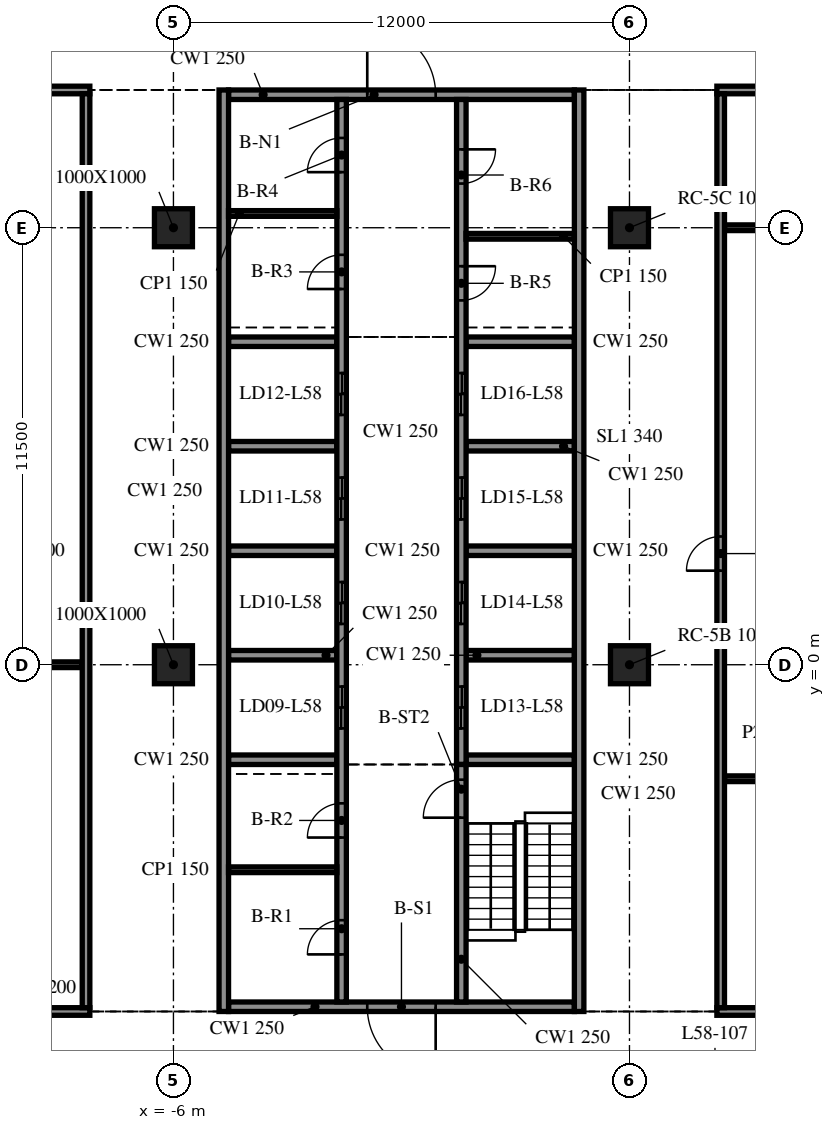
"""IFC4 building model, lengths in metres.
Left out: names, types, materials, properties, quantities, classifications, styles, units other than length and angle.
Written with IfcOpenShell. Run it as: python <this file> out.ifc"""

import sys

from ifc_helpers import new_model, si_unit, direction, frame, frame_2d, origin, origin_2d, place, context, subcontext, project, spatial, rectangle, extrude, element, fill, save


model = new_model("IFC4")
c1 = context("Model", 3, precision=1e-05, world=origin(), true_north=direction((0.0, 1.0)))
c2 = subcontext(c1, "Body", "Model", "MODEL_VIEW")
j1 = project(units=[si_unit("LENGTHUNIT", "METRE"), si_unit("PLANEANGLEUNIT", "RADIAN")], contexts=[c1])
p1 = place(None, origin())
s1 = spatial("IfcSite", under=j1, at=p1, CompositionType="ELEMENT")
p2 = place(p1, origin())
s2 = spatial("IfcBuilding", under=s1, at=p2, CompositionType="ELEMENT")
p3 = place(p2, frame((0.0, 0.0, 240.0)))
s3 = spatial("IfcBuildingStorey", under=s2, at=p3, CompositionType="ELEMENT", Elevation=240.0)
for number, where, z_axis, x_axis in (
    (1, (-6.0, 0.0, -0.34), (0.0, 0.0, 1.0), (1.0, 0.0, 0.0)),
    (2, (-6.0, 11.5, -0.34), (0.0, 0.0, 1.0), (1.0, 0.0, 0.0)),
    (3, (6.0, 0.0, -0.34), (0.0, 0.0, 1.0), (1.0, 0.0, 0.0)),
    (4, (6.0, 11.5, -0.34), (0.0, 0.0, 1.0), (1.0, 0.0, 0.0)),
):
    element("IfcColumn", number, at=place(p3, frame(where, z_axis=z_axis, x_axis=x_axis)), inside=s3, PredefinedType="COLUMN", context=c2, shape_type="SweptSolid", body=[
        extrude(rectangle(XDim=1.0, YDim=1.0, at=origin_2d()), origin(), (0.0, 0.0, 1.0), 3.8),
    ])
for number, where, z_axis, x_axis in (
    (5, (-4.675, 15.125, 0.0), (0.0, 0.0, 1.0), (0.0, -1.0, 0.0)),
    (6, (4.675, -9.125, 0.0), (0.0, 0.0, 1.0), (0.0, 1.0, 0.0)),
):
    element("IfcWall", number, at=place(p3, frame(where, z_axis=z_axis, x_axis=x_axis)), inside=s3, PredefinedType="SOLIDWALL", context=c2, shape_type="SweptSolid", body=[
        extrude(rectangle(XDim=24.25, YDim=0.25, at=frame_2d((12.125, 0.0))), origin(), (0.0, 0.0, 1.0), 3.46),
    ])
p4 = place(p3, frame((4.55, -9.0, 0.0), z_axis=(0.0, 0.0, 1.0), x_axis=(-1.0, 0.0, 0.0)))
e7 = element("IfcWall", 7, at=p4, inside=s3, PredefinedType="SOLIDWALL", context=c2, shape_type="SweptSolid", body=[
    extrude(rectangle(XDim=9.1, YDim=0.25, at=frame_2d((4.55, 0.0))), origin(), (0.0, 0.0, 1.0), 3.46),
])
p5 = place(p4, frame((3.65, 0.0, 0.0)))
e8 = element("IfcOpeningElement", 8, at=p5, cuts=e7, PredefinedType="OPENING", context=c2, shape_type="SweptSolid", body=[
    extrude(rectangle(XDim=1.8, YDim=2.1, at=frame_2d((0.9, 1.05))), frame((0.0, 0.135, 0.0), z_axis=(0.0, -1.0, 0.0), x_axis=(1.0, 0.0, 0.0)), (0.0, 0.0, 1.0), 0.27),
])
p6 = place(p3, frame((-4.55, 15.0, 0.0), z_axis=(0.0, 0.0, 1.0), x_axis=(1.0, 0.0, 0.0)))
e9 = element("IfcWall", 9, at=p6, inside=s3, PredefinedType="SOLIDWALL", context=c2, shape_type="SweptSolid", body=[
    extrude(rectangle(XDim=9.1, YDim=0.25, at=frame_2d((4.55, 0.0))), origin(), (0.0, 0.0, 1.0), 3.46),
])
p7 = place(p6, frame((3.65, 0.0, 0.0)))
e10 = element("IfcOpeningElement", 10, at=p7, cuts=e9, PredefinedType="OPENING", context=c2, shape_type="SweptSolid", body=[
    extrude(rectangle(XDim=1.8, YDim=2.1, at=frame_2d((0.9, 1.05))), frame((0.0, 0.135, 0.0), z_axis=(0.0, -1.0, 0.0), x_axis=(1.0, 0.0, 0.0)), (0.0, 0.0, 1.0), 0.27),
])
p8 = place(p3, frame((-1.575, -8.875, 0.0), z_axis=(0.0, 0.0, 1.0), x_axis=(0.0, 1.0, 0.0)))
e11 = element("IfcWall", 11, at=p8, inside=s3, PredefinedType="SOLIDWALL", context=c2, shape_type="SweptSolid", body=[
    extrude(rectangle(XDim=23.75, YDim=0.25, at=frame_2d((11.875, 0.0))), origin(), (0.0, 0.0, 1.0), 3.46),
])
p9 = place(p8, frame((7.2, 0.0, 0.0)))
e12 = element("IfcOpeningElement", 12, at=p9, cuts=e11, PredefinedType="OPENING", context=c2, shape_type="SweptSolid", body=[
    extrude(rectangle(XDim=1.1, YDim=2.1, at=frame_2d((0.55, 1.05))), frame((0.0, 0.135, 0.0), z_axis=(0.0, -1.0, 0.0), x_axis=(1.0, 0.0, 0.0)), (0.0, 0.0, 1.0), 0.27),
])
p10 = place(p8, frame((9.95, 0.0, 0.0)))
e13 = element("IfcOpeningElement", 13, at=p10, cuts=e11, PredefinedType="OPENING", context=c2, shape_type="SweptSolid", body=[
    extrude(rectangle(XDim=1.1, YDim=2.1, at=frame_2d((0.55, 1.05))), frame((0.0, 0.135, 0.0), z_axis=(0.0, -1.0, 0.0), x_axis=(1.0, 0.0, 0.0)), (0.0, 0.0, 1.0), 0.27),
])
p11 = place(p8, frame((12.7, 0.0, 0.0)))
e14 = element("IfcOpeningElement", 14, at=p11, cuts=e11, PredefinedType="OPENING", context=c2, shape_type="SweptSolid", body=[
    extrude(rectangle(XDim=1.1, YDim=2.1, at=frame_2d((0.55, 1.05))), frame((0.0, 0.135, 0.0), z_axis=(0.0, -1.0, 0.0), x_axis=(1.0, 0.0, 0.0)), (0.0, 0.0, 1.0), 0.27),
])
p12 = place(p8, frame((15.45, 0.0, 0.0)))
e15 = element("IfcOpeningElement", 15, at=p12, cuts=e11, PredefinedType="OPENING", context=c2, shape_type="SweptSolid", body=[
    extrude(rectangle(XDim=1.1, YDim=2.1, at=frame_2d((0.55, 1.05))), frame((0.0, 0.135, 0.0), z_axis=(0.0, -1.0, 0.0), x_axis=(1.0, 0.0, 0.0)), (0.0, 0.0, 1.0), 0.27),
])
p13 = place(p8, frame((1.252, 0.0, 0.0)))
e16 = element("IfcOpeningElement", 16, at=p13, cuts=e11, PredefinedType="OPENING", context=c2, shape_type="SweptSolid", body=[
    extrude(rectangle(XDim=0.9, YDim=2.1, at=frame_2d((0.45, 1.05))), frame((0.0, 0.135, 0.0), z_axis=(0.0, -1.0, 0.0), x_axis=(1.0, 0.0, 0.0)), (0.0, 0.0, 1.0), 0.27),
])
p14 = place(p8, frame((4.327, 0.0, 0.0)))
e17 = element("IfcOpeningElement", 17, at=p14, cuts=e11, PredefinedType="OPENING", context=c2, shape_type="SweptSolid", body=[
    extrude(rectangle(XDim=0.9, YDim=2.1, at=frame_2d((0.45, 1.05))), frame((0.0, 0.135, 0.0), z_axis=(0.0, -1.0, 0.0), x_axis=(1.0, 0.0, 0.0)), (0.0, 0.0, 1.0), 0.27),
])
p15 = place(p8, frame((18.762, 0.0, 0.0)))
e18 = element("IfcOpeningElement", 18, at=p15, cuts=e11, PredefinedType="OPENING", context=c2, shape_type="SweptSolid", body=[
    extrude(rectangle(XDim=0.9, YDim=2.1, at=frame_2d((0.45, 1.05))), frame((0.0, 0.135, 0.0), z_axis=(0.0, -1.0, 0.0), x_axis=(1.0, 0.0, 0.0)), (0.0, 0.0, 1.0), 0.27),
])
p16 = place(p8, frame((21.837, 0.0, 0.0)))
e19 = element("IfcOpeningElement", 19, at=p16, cuts=e11, PredefinedType="OPENING", context=c2, shape_type="SweptSolid", body=[
    extrude(rectangle(XDim=0.9, YDim=2.1, at=frame_2d((0.45, 1.05))), frame((0.0, 0.135, 0.0), z_axis=(0.0, -1.0, 0.0), x_axis=(1.0, 0.0, 0.0)), (0.0, 0.0, 1.0), 0.27),
])
p17 = place(p3, frame((1.575, -8.875, 0.0), z_axis=(0.0, 0.0, 1.0), x_axis=(0.0, 1.0, 0.0)))
e20 = element("IfcWall", 20, at=p17, inside=s3, PredefinedType="SOLIDWALL", context=c2, shape_type="SweptSolid", body=[
    extrude(rectangle(XDim=6.25, YDim=0.25, at=frame_2d((3.125, 0.0))), origin(), (0.0, 0.0, 1.0), 3.46),
])
p18 = place(p17, frame((4.85, 0.0, 0.0)))
e21 = element("IfcOpeningElement", 21, at=p18, cuts=e20, PredefinedType="OPENING", context=c2, shape_type="SweptSolid", body=[
    extrude(rectangle(XDim=1.0, YDim=2.1, at=frame_2d((0.5, 1.05))), frame((0.0, 0.135, 0.0), z_axis=(0.0, -1.0, 0.0), x_axis=(1.0, 0.0, 0.0)), (0.0, 0.0, 1.0), 0.27),
])
p19 = place(p3, frame((1.575, 14.875, 0.0), z_axis=(0.0, 0.0, 1.0), x_axis=(0.0, -1.0, 0.0)))
e22 = element("IfcWall", 22, at=p19, inside=s3, PredefinedType="SOLIDWALL", context=c2, shape_type="SweptSolid", body=[
    extrude(rectangle(XDim=17.5, YDim=0.25, at=frame_2d((8.75, 0.0))), origin(), (0.0, 0.0, 1.0), 3.46),
])
p20 = place(p19, frame((15.45, 0.0, 0.0)))
e23 = element("IfcOpeningElement", 23, at=p20, cuts=e22, PredefinedType="OPENING", context=c2, shape_type="SweptSolid", body=[
    extrude(rectangle(XDim=1.1, YDim=2.1, at=frame_2d((0.55, 1.05))), frame((0.0, 0.135, 0.0), z_axis=(0.0, -1.0, 0.0), x_axis=(1.0, 0.0, 0.0)), (0.0, 0.0, 1.0), 0.27),
])
p21 = place(p19, frame((12.7, 0.0, 0.0)))
e24 = element("IfcOpeningElement", 24, at=p21, cuts=e22, PredefinedType="OPENING", context=c2, shape_type="SweptSolid", body=[
    extrude(rectangle(XDim=1.1, YDim=2.1, at=frame_2d((0.55, 1.05))), frame((0.0, 0.135, 0.0), z_axis=(0.0, -1.0, 0.0), x_axis=(1.0, 0.0, 0.0)), (0.0, 0.0, 1.0), 0.27),
])
p22 = place(p19, frame((9.95, 0.0, 0.0)))
e25 = element("IfcOpeningElement", 25, at=p22, cuts=e22, PredefinedType="OPENING", context=c2, shape_type="SweptSolid", body=[
    extrude(rectangle(XDim=1.1, YDim=2.1, at=frame_2d((0.55, 1.05))), frame((0.0, 0.135, 0.0), z_axis=(0.0, -1.0, 0.0), x_axis=(1.0, 0.0, 0.0)), (0.0, 0.0, 1.0), 0.27),
])
p23 = place(p19, frame((7.2, 0.0, 0.0)))
e26 = element("IfcOpeningElement", 26, at=p23, cuts=e22, PredefinedType="OPENING", context=c2, shape_type="SweptSolid", body=[
    extrude(rectangle(XDim=1.1, YDim=2.1, at=frame_2d((0.55, 1.05))), frame((0.0, 0.135, 0.0), z_axis=(0.0, -1.0, 0.0), x_axis=(1.0, 0.0, 0.0)), (0.0, 0.0, 1.0), 0.27),
])
p24 = place(p19, frame((4.387, 0.0, 0.0)))
e27 = element("IfcOpeningElement", 27, at=p24, cuts=e22, PredefinedType="OPENING", context=c2, shape_type="SweptSolid", body=[
    extrude(rectangle(XDim=0.9, YDim=2.1, at=frame_2d((0.45, 1.05))), frame((0.0, 0.135, 0.0), z_axis=(0.0, -1.0, 0.0), x_axis=(1.0, 0.0, 0.0)), (0.0, 0.0, 1.0), 0.27),
])
p25 = place(p19, frame((1.312, 0.0, 0.0)))
e28 = element("IfcOpeningElement", 28, at=p25, cuts=e22, PredefinedType="OPENING", context=c2, shape_type="SweptSolid", body=[
    extrude(rectangle(XDim=0.9, YDim=2.1, at=frame_2d((0.45, 1.05))), frame((0.0, 0.135, 0.0), z_axis=(0.0, -1.0, 0.0), x_axis=(1.0, 0.0, 0.0)), (0.0, 0.0, 1.0), 0.27),
])
for number, where, z_axis, x_axis in (
    (29, (-4.55, -2.5, 0.0), (0.0, 0.0, 1.0), (1.0, 0.0, 0.0)),
    (30, (-4.55, 0.25, 0.0), (0.0, 0.0, 1.0), (1.0, 0.0, 0.0)),
    (31, (-4.55, 3.0, 0.0), (0.0, 0.0, 1.0), (1.0, 0.0, 0.0)),
    (32, (-4.55, 5.75, 0.0), (0.0, 0.0, 1.0), (1.0, 0.0, 0.0)),
    (33, (-4.55, 8.5, 0.0), (0.0, 0.0, 1.0), (1.0, 0.0, 0.0)),
    (34, (1.7, -2.5, 0.0), (0.0, 0.0, 1.0), (1.0, 0.0, 0.0)),
    (35, (1.7, 0.25, 0.0), (0.0, 0.0, 1.0), (1.0, 0.0, 0.0)),
    (36, (1.7, 3.0, 0.0), (0.0, 0.0, 1.0), (1.0, 0.0, 0.0)),
    (37, (1.7, 5.75, 0.0), (0.0, 0.0, 1.0), (1.0, 0.0, 0.0)),
    (38, (1.7, 8.5, 0.0), (0.0, 0.0, 1.0), (1.0, 0.0, 0.0)),
):
    element("IfcWall", number, at=place(p3, frame(where, z_axis=z_axis, x_axis=x_axis)), inside=s3, PredefinedType="SOLIDWALL", context=c2, shape_type="SweptSolid", body=[
        extrude(rectangle(XDim=2.85, YDim=0.25, at=frame_2d((1.425, 0.0))), origin(), (0.0, 0.0, 1.0), 3.46),
    ])
for number, where, z_axis, x_axis in (
    (39, (-4.55, -5.395, 0.0), (0.0, 0.0, 1.0), (1.0, 0.0, 0.0)),
    (40, (-4.55, 11.875, 0.0), (0.0, 0.0, 1.0), (1.0, 0.0, 0.0)),
    (41, (1.7, 11.275, 0.0), (0.0, 0.0, 1.0), (1.0, 0.0, 0.0)),
):
    element("IfcWall", number, at=place(p3, frame(where, z_axis=z_axis, x_axis=x_axis)), inside=s3, PredefinedType="PARTITIONING", context=c2, shape_type="SweptSolid", body=[
        extrude(rectangle(XDim=2.85, YDim=0.15, at=frame_2d((1.425, 0.0))), origin(), (0.0, 0.0, 1.0), 3.46),
    ])
p26 = place(p3, frame((-15.9, -9.125, 0.0), z_axis=(0.0, 0.0, 1.0), x_axis=(1.0, 0.0, 0.0)))
e42 = element("IfcWall", 42, at=p26, inside=s3, PredefinedType="PARTITIONING", context=c2, shape_type="SweptSolid", body=[
    extrude(rectangle(XDim=7.7, YDim=0.2, at=frame_2d((3.85, 0.0))), origin(), (0.0, 0.0, 1.0), 3.46),
])
p27 = place(p26, frame((3.3, 0.0, 0.0)))
e43 = element("IfcOpeningElement", 43, at=p27, cuts=e42, PredefinedType="OPENING", context=c2, shape_type="SweptSolid", body=[
    extrude(rectangle(XDim=0.9, YDim=2.1, at=frame_2d((0.45, 1.05))), frame((0.0, 0.11, 0.0), z_axis=(0.0, -1.0, 0.0), x_axis=(1.0, 0.0, 0.0)), (0.0, 0.0, 1.0), 0.22),
])
p28 = place(p3, frame((8.3, -9.125, 0.0), z_axis=(0.0, 0.0, 1.0), x_axis=(1.0, 0.0, 0.0)))
e44 = element("IfcWall", 44, at=p28, inside=s3, PredefinedType="PARTITIONING", context=c2, shape_type="SweptSolid", body=[
    extrude(rectangle(XDim=7.3, YDim=0.2, at=frame_2d((3.65, 0.0))), origin(), (0.0, 0.0, 1.0), 3.46),
])
p29 = place(p28, frame((3.1, 0.0, 0.0)))
e45 = element("IfcOpeningElement", 45, at=p29, cuts=e44, PredefinedType="OPENING", context=c2, shape_type="SweptSolid", body=[
    extrude(rectangle(XDim=0.9, YDim=2.1, at=frame_2d((0.45, 1.05))), frame((0.0, 0.11, 0.0), z_axis=(0.0, -1.0, 0.0), x_axis=(1.0, 0.0, 0.0)), (0.0, 0.0, 1.0), 0.22),
])
p30 = place(p3, frame((8.5, -3.0, 0.0), z_axis=(0.0, 0.0, 1.0), x_axis=(1.0, 0.0, 0.0)))
e46 = element("IfcWall", 46, at=p30, inside=s3, PredefinedType="PARTITIONING", context=c2, shape_type="SweptSolid", body=[
    extrude(rectangle(XDim=6.9, YDim=0.15, at=frame_2d((3.45, 0.0))), origin(), (0.0, 0.0, 1.0), 3.46),
])
p31 = place(p3, frame((-15.7, 0.0, 0.0), z_axis=(0.0, 0.0, 1.0), x_axis=(1.0, 0.0, 0.0)))
e47 = element("IfcWall", 47, at=p31, inside=s3, PredefinedType="PARTITIONING", context=c2, shape_type="SweptSolid", body=[
    extrude(rectangle(XDim=7.3, YDim=0.15, at=frame_2d((3.65, 0.0))), origin(), (0.0, 0.0, 1.0), 3.46),
])
p32 = place(p3, frame((8.5, 11.5, 0.0), z_axis=(0.0, 0.0, 1.0), x_axis=(1.0, 0.0, 0.0)))
e48 = element("IfcWall", 48, at=p32, inside=s3, PredefinedType="PARTITIONING", context=c2, shape_type="SweptSolid", body=[
    extrude(rectangle(XDim=6.9, YDim=0.15, at=frame_2d((3.45, 0.0))), origin(), (0.0, 0.0, 1.0), 3.46),
])
p33 = place(p3, frame((-15.9, 15.125, 0.0), z_axis=(0.0, 0.0, 1.0), x_axis=(1.0, 0.0, 0.0)))
e49 = element("IfcWall", 49, at=p33, inside=s3, PredefinedType="PARTITIONING", context=c2, shape_type="SweptSolid", body=[
    extrude(rectangle(XDim=7.7, YDim=0.2, at=frame_2d((3.85, 0.0))), origin(), (0.0, 0.0, 1.0), 3.46),
])
p34 = place(p3, frame((8.3, 15.125, 0.0), z_axis=(0.0, 0.0, 1.0), x_axis=(1.0, 0.0, 0.0)))
e50 = element("IfcWall", 50, at=p34, inside=s3, PredefinedType="PARTITIONING", context=c2, shape_type="SweptSolid", body=[
    extrude(rectangle(XDim=7.3, YDim=0.2, at=frame_2d((3.65, 0.0))), origin(), (0.0, 0.0, 1.0), 3.46),
])
p35 = place(p34, frame((3.1, 0.0, 0.0)))
e51 = element("IfcOpeningElement", 51, at=p35, cuts=e50, PredefinedType="OPENING", context=c2, shape_type="SweptSolid", body=[
    extrude(rectangle(XDim=0.9, YDim=2.1, at=frame_2d((0.45, 1.05))), frame((0.0, 0.11, 0.0), z_axis=(0.0, -1.0, 0.0), x_axis=(1.0, 0.0, 0.0)), (0.0, 0.0, 1.0), 0.22),
])
p36 = place(p3, frame((-8.3, -9.025, 0.0), z_axis=(0.0, 0.0, 1.0), x_axis=(0.0, 1.0, 0.0)))
e52 = element("IfcWall", 52, at=p36, inside=s3, PredefinedType="PARTITIONING", context=c2, shape_type="SweptSolid", body=[
    extrude(rectangle(XDim=24.05, YDim=0.2, at=frame_2d((12.025, 0.0))), origin(), (0.0, 0.0, 1.0), 3.46),
])
p37 = place(p3, frame((8.4, -9.025, 0.0), z_axis=(0.0, 0.0, 1.0), x_axis=(0.0, 1.0, 0.0)))
e53 = element("IfcWall", 53, at=p37, inside=s3, PredefinedType="PARTITIONING", context=c2, shape_type="SweptSolid", body=[
    extrude(rectangle(XDim=24.05, YDim=0.2, at=frame_2d((12.025, 0.0))), origin(), (0.0, 0.0, 1.0), 3.46),
])
p38 = place(p37, frame((11.5, 0.0, 0.0)))
e54 = element("IfcOpeningElement", 54, at=p38, cuts=e53, PredefinedType="OPENING", context=c2, shape_type="SweptSolid", body=[
    extrude(rectangle(XDim=0.9, YDim=2.1, at=frame_2d((0.45, 1.05))), frame((0.0, 0.11, 0.0), z_axis=(0.0, -1.0, 0.0), x_axis=(1.0, 0.0, 0.0)), (0.0, 0.0, 1.0), 0.22),
])
p39 = place(p5, origin())
e55 = element("IfcDoor", 55, at=p39, inside=s3, OperationType="DOUBLE_DOOR_SINGLE_SWING", PredefinedType="DOOR", context=c2, shape_type="SweptSolid", body=[
    extrude(rectangle(XDim=1.8, YDim=2.1, at=frame_2d((0.9, 1.05))), frame((0.0, 0.025, 0.0), z_axis=(0.0, -1.0, 0.0), x_axis=(1.0, 0.0, 0.0)), (0.0, 0.0, 1.0), 0.05),
])
fill(e8, e55)
p40 = place(p7, origin())
e56 = element("IfcDoor", 56, at=p40, inside=s3, OperationType="DOUBLE_DOOR_SINGLE_SWING", PredefinedType="DOOR", context=c2, shape_type="SweptSolid", body=[
    extrude(rectangle(XDim=1.8, YDim=2.1, at=frame_2d((0.9, 1.05))), frame((0.0, 0.025, 0.0), z_axis=(0.0, -1.0, 0.0), x_axis=(1.0, 0.0, 0.0)), (0.0, 0.0, 1.0), 0.05),
])
fill(e10, e56)
p41 = place(p20, origin())
e57 = element("IfcDoor", 57, at=p41, inside=s3, OperationType="DOUBLE_DOOR_SLIDING", PredefinedType="DOOR", context=c2, shape_type="SweptSolid", body=[
    extrude(rectangle(XDim=1.1, YDim=2.1, at=frame_2d((0.55, 1.05))), frame((0.0, 0.025, 0.0), z_axis=(0.0, -1.0, 0.0), x_axis=(1.0, 0.0, 0.0)), (0.0, 0.0, 1.0), 0.05),
])
fill(e23, e57)
p42 = place(p21, origin())
e58 = element("IfcDoor", 58, at=p42, inside=s3, OperationType="DOUBLE_DOOR_SLIDING", PredefinedType="DOOR", context=c2, shape_type="SweptSolid", body=[
    extrude(rectangle(XDim=1.1, YDim=2.1, at=frame_2d((0.55, 1.05))), frame((0.0, 0.025, 0.0), z_axis=(0.0, -1.0, 0.0), x_axis=(1.0, 0.0, 0.0)), (0.0, 0.0, 1.0), 0.05),
])
fill(e24, e58)
p43 = place(p22, origin())
e59 = element("IfcDoor", 59, at=p43, inside=s3, OperationType="DOUBLE_DOOR_SLIDING", PredefinedType="DOOR", context=c2, shape_type="SweptSolid", body=[
    extrude(rectangle(XDim=1.1, YDim=2.1, at=frame_2d((0.55, 1.05))), frame((0.0, 0.025, 0.0), z_axis=(0.0, -1.0, 0.0), x_axis=(1.0, 0.0, 0.0)), (0.0, 0.0, 1.0), 0.05),
])
fill(e25, e59)
p44 = place(p23, origin())
e60 = element("IfcDoor", 60, at=p44, inside=s3, OperationType="DOUBLE_DOOR_SLIDING", PredefinedType="DOOR", context=c2, shape_type="SweptSolid", body=[
    extrude(rectangle(XDim=1.1, YDim=2.1, at=frame_2d((0.55, 1.05))), frame((0.0, 0.025, 0.0), z_axis=(0.0, -1.0, 0.0), x_axis=(1.0, 0.0, 0.0)), (0.0, 0.0, 1.0), 0.05),
])
fill(e26, e60)
p45 = place(p9, origin())
e61 = element("IfcDoor", 61, at=p45, inside=s3, OperationType="DOUBLE_DOOR_SLIDING", PredefinedType="DOOR", context=c2, shape_type="SweptSolid", body=[
    extrude(rectangle(XDim=1.1, YDim=2.1, at=frame_2d((0.55, 1.05))), frame((0.0, 0.025, 0.0), z_axis=(0.0, -1.0, 0.0), x_axis=(1.0, 0.0, 0.0)), (0.0, 0.0, 1.0), 0.05),
])
fill(e12, e61)
p46 = place(p10, origin())
e62 = element("IfcDoor", 62, at=p46, inside=s3, OperationType="DOUBLE_DOOR_SLIDING", PredefinedType="DOOR", context=c2, shape_type="SweptSolid", body=[
    extrude(rectangle(XDim=1.1, YDim=2.1, at=frame_2d((0.55, 1.05))), frame((0.0, 0.025, 0.0), z_axis=(0.0, -1.0, 0.0), x_axis=(1.0, 0.0, 0.0)), (0.0, 0.0, 1.0), 0.05),
])
fill(e13, e62)
p47 = place(p11, origin())
e63 = element("IfcDoor", 63, at=p47, inside=s3, OperationType="DOUBLE_DOOR_SLIDING", PredefinedType="DOOR", context=c2, shape_type="SweptSolid", body=[
    extrude(rectangle(XDim=1.1, YDim=2.1, at=frame_2d((0.55, 1.05))), frame((0.0, 0.025, 0.0), z_axis=(0.0, -1.0, 0.0), x_axis=(1.0, 0.0, 0.0)), (0.0, 0.0, 1.0), 0.05),
])
fill(e14, e63)
p48 = place(p12, origin())
e64 = element("IfcDoor", 64, at=p48, inside=s3, OperationType="DOUBLE_DOOR_SLIDING", PredefinedType="DOOR", context=c2, shape_type="SweptSolid", body=[
    extrude(rectangle(XDim=1.1, YDim=2.1, at=frame_2d((0.55, 1.05))), frame((0.0, 0.025, 0.0), z_axis=(0.0, -1.0, 0.0), x_axis=(1.0, 0.0, 0.0)), (0.0, 0.0, 1.0), 0.05),
])
fill(e15, e64)
p49 = place(p13, origin())
e65 = element("IfcDoor", 65, at=p49, inside=s3, OperationType="SINGLE_SWING_LEFT", PredefinedType="DOOR", context=c2, shape_type="SweptSolid", body=[
    extrude(rectangle(XDim=0.9, YDim=2.1, at=frame_2d((0.45, 1.05))), frame((0.0, 0.025, 0.0), z_axis=(0.0, -1.0, 0.0), x_axis=(1.0, 0.0, 0.0)), (0.0, 0.0, 1.0), 0.05),
])
fill(e16, e65)
p50 = place(p14, origin())
e66 = element("IfcDoor", 66, at=p50, inside=s3, OperationType="SINGLE_SWING_RIGHT", PredefinedType="DOOR", context=c2, shape_type="SweptSolid", body=[
    extrude(rectangle(XDim=0.9, YDim=2.1, at=frame_2d((0.45, 1.05))), frame((0.0, 0.025, 0.0), z_axis=(0.0, -1.0, 0.0), x_axis=(1.0, 0.0, 0.0)), (0.0, 0.0, 1.0), 0.05),
])
fill(e17, e66)
p51 = place(p15, origin())
e67 = element("IfcDoor", 67, at=p51, inside=s3, OperationType="SINGLE_SWING_LEFT", PredefinedType="DOOR", context=c2, shape_type="SweptSolid", body=[
    extrude(rectangle(XDim=0.9, YDim=2.1, at=frame_2d((0.45, 1.05))), frame((0.0, 0.025, 0.0), z_axis=(0.0, -1.0, 0.0), x_axis=(1.0, 0.0, 0.0)), (0.0, 0.0, 1.0), 0.05),
])
fill(e18, e67)
p52 = place(p16, origin())
e68 = element("IfcDoor", 68, at=p52, inside=s3, OperationType="SINGLE_SWING_RIGHT", PredefinedType="DOOR", context=c2, shape_type="SweptSolid", body=[
    extrude(rectangle(XDim=0.9, YDim=2.1, at=frame_2d((0.45, 1.05))), frame((0.0, 0.025, 0.0), z_axis=(0.0, -1.0, 0.0), x_axis=(1.0, 0.0, 0.0)), (0.0, 0.0, 1.0), 0.05),
])
fill(e19, e68)
p53 = place(p24, origin())
e69 = element("IfcDoor", 69, at=p53, inside=s3, OperationType="SINGLE_SWING_LEFT", PredefinedType="DOOR", context=c2, shape_type="SweptSolid", body=[
    extrude(rectangle(XDim=0.9, YDim=2.1, at=frame_2d((0.45, 1.05))), frame((0.0, 0.025, 0.0), z_axis=(0.0, -1.0, 0.0), x_axis=(1.0, 0.0, 0.0)), (0.0, 0.0, 1.0), 0.05),
])
fill(e27, e69)
p54 = place(p25, origin())
e70 = element("IfcDoor", 70, at=p54, inside=s3, OperationType="SINGLE_SWING_RIGHT", PredefinedType="DOOR", context=c2, shape_type="SweptSolid", body=[
    extrude(rectangle(XDim=0.9, YDim=2.1, at=frame_2d((0.45, 1.05))), frame((0.0, 0.025, 0.0), z_axis=(0.0, -1.0, 0.0), x_axis=(1.0, 0.0, 0.0)), (0.0, 0.0, 1.0), 0.05),
])
fill(e28, e70)
p55 = place(p18, origin())
e71 = element("IfcDoor", 71, at=p55, inside=s3, OperationType="SINGLE_SWING_LEFT", PredefinedType="DOOR", context=c2, shape_type="SweptSolid", body=[
    extrude(rectangle(XDim=1.0, YDim=2.1, at=frame_2d((0.5, 1.05))), frame((0.0, 0.025, 0.0), z_axis=(0.0, -1.0, 0.0), x_axis=(1.0, 0.0, 0.0)), (0.0, 0.0, 1.0), 0.05),
])
fill(e21, e71)
p56 = place(p38, origin())
e72 = element("IfcDoor", 72, at=p56, inside=s3, OperationType="SINGLE_SWING_RIGHT", PredefinedType="DOOR", context=c2, shape_type="SweptSolid", body=[
    extrude(rectangle(XDim=0.9, YDim=2.1, at=frame_2d((0.45, 1.05))), frame((0.0, 0.025, 0.0), z_axis=(0.0, -1.0, 0.0), x_axis=(1.0, 0.0, 0.0)), (0.0, 0.0, 1.0), 0.05),
])
fill(e54, e72)
save(model, sys.argv[1])
